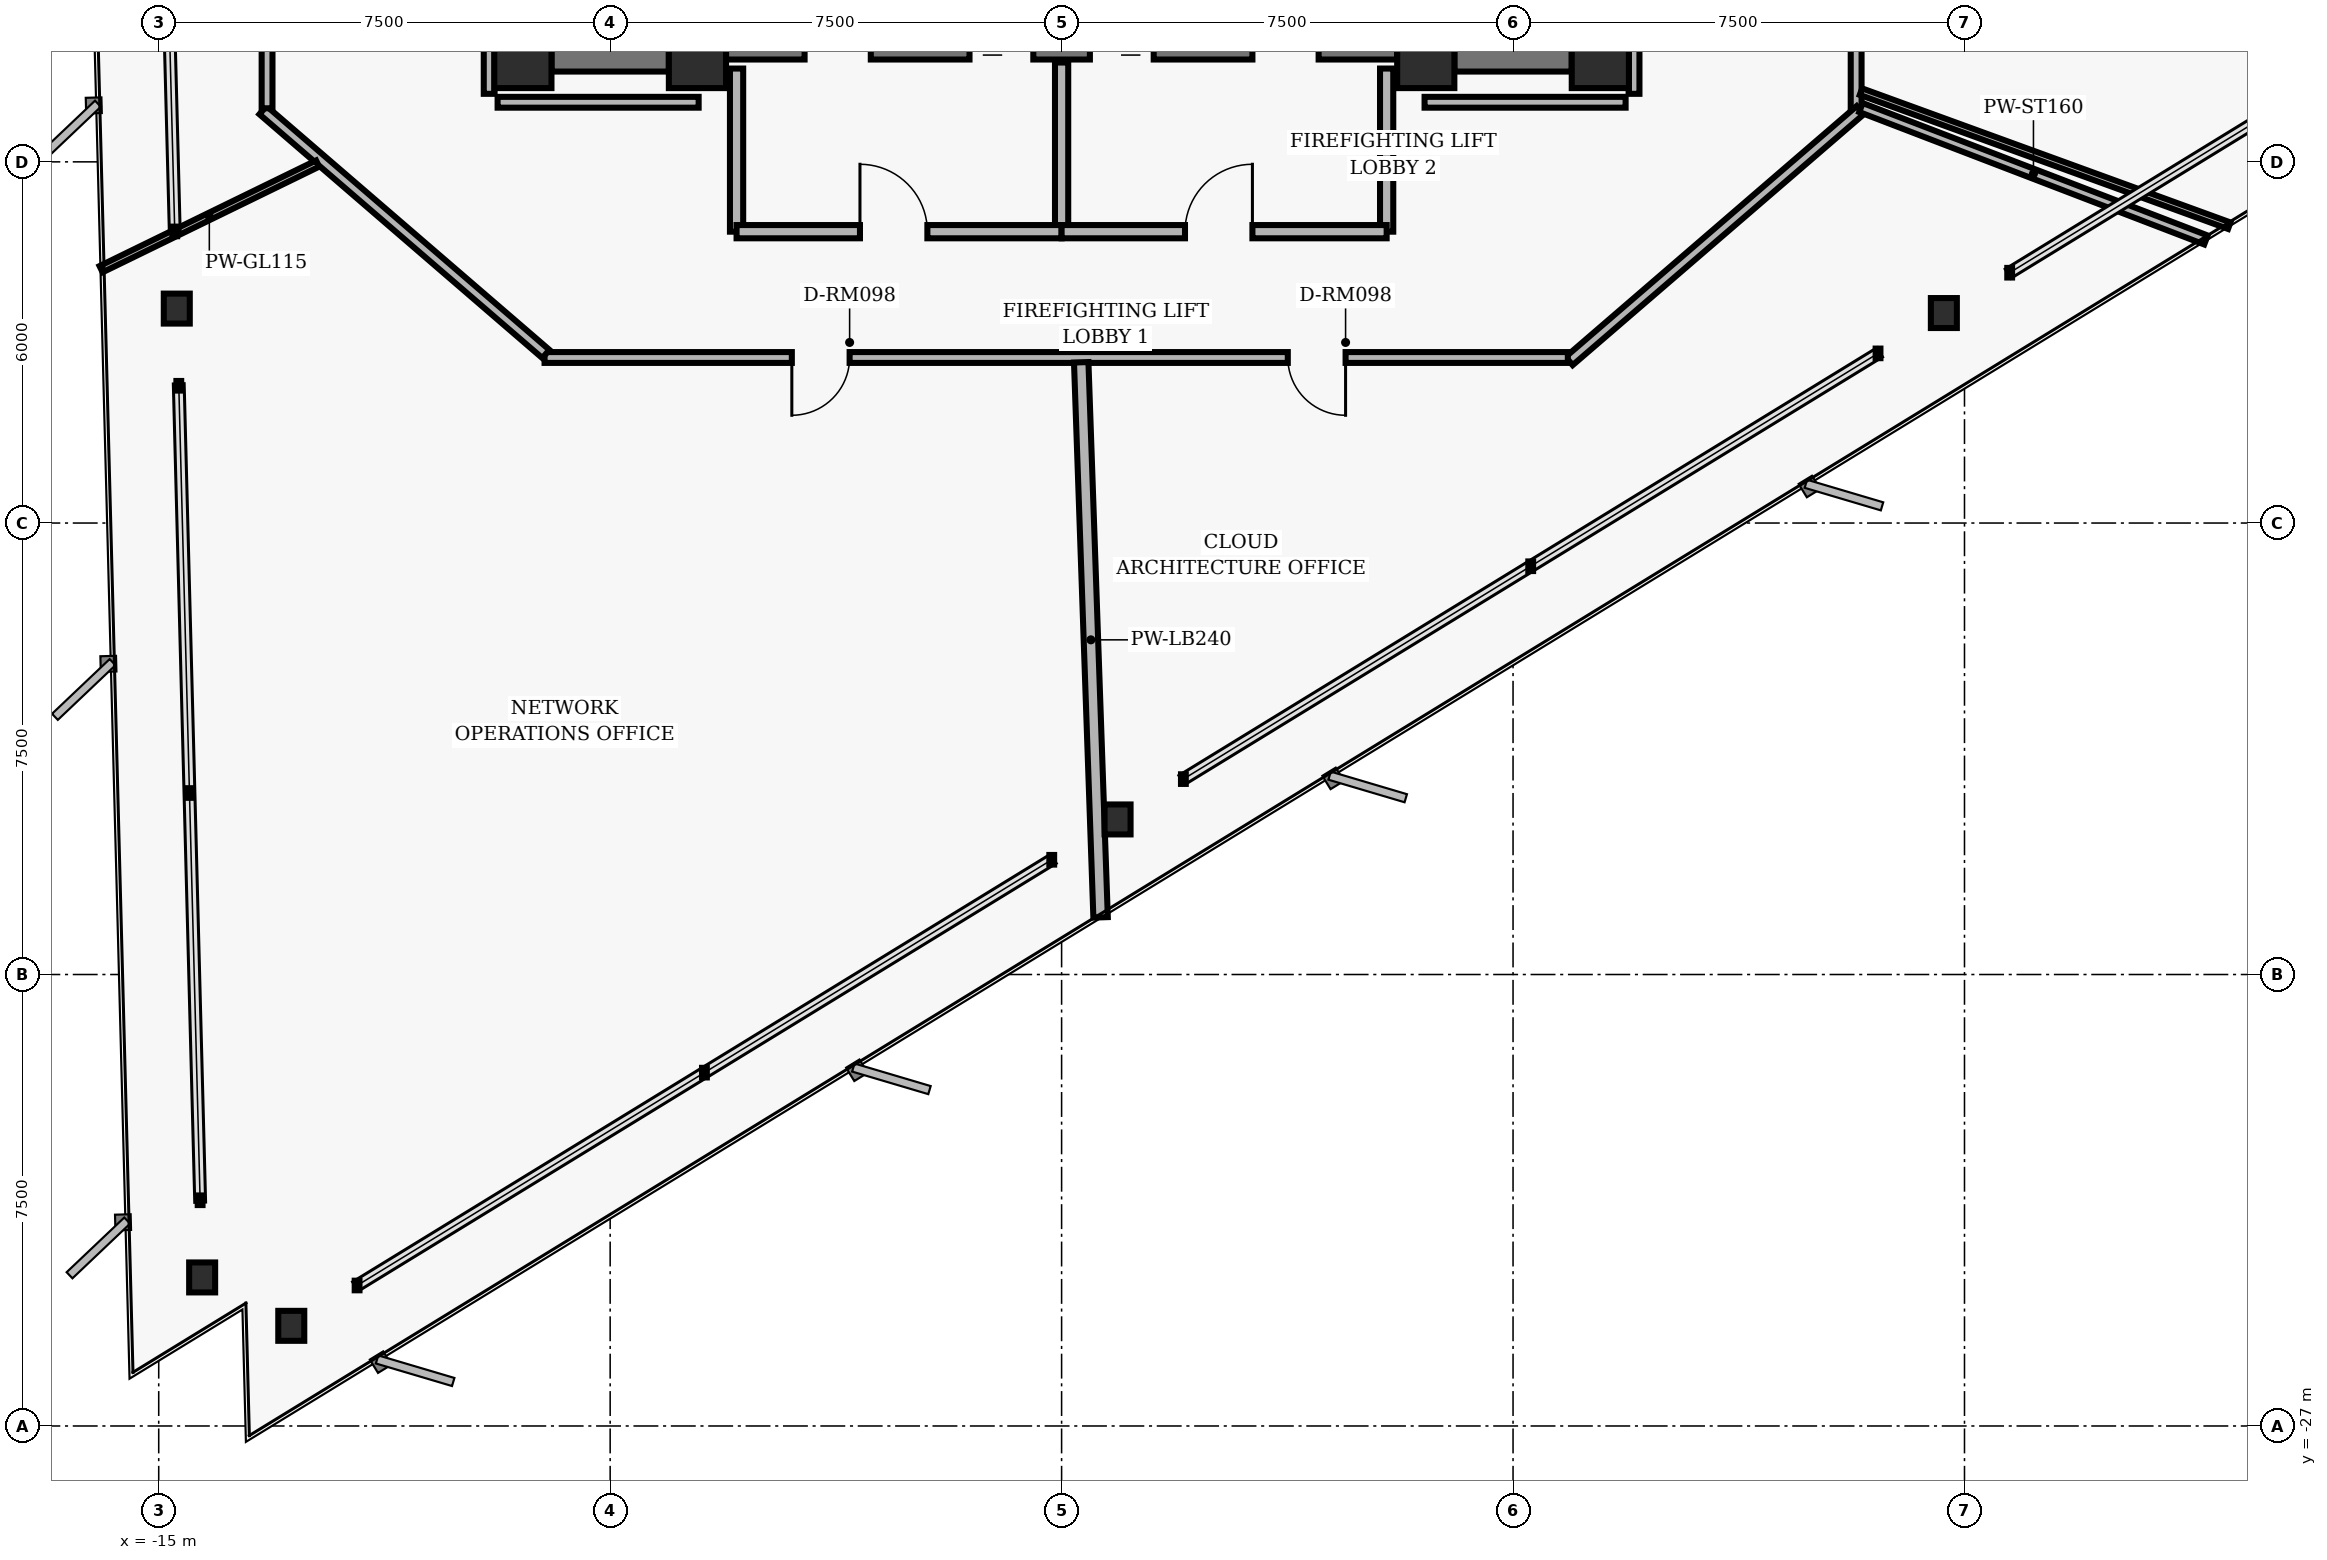
"""IFC4 building model, lengths in metres.
Left out: names, types, materials, properties, quantities, classifications, styles, units other than length and angle.
Written with IfcOpenShell. Run it as: python <this file> out.ifc"""

import sys

from ifc_helpers import new_model, si_unit, direction, frame, frame_2d, origin, origin_2d, place, context, subcontext, project, spatial, rectangle, hollow_rectangle, i_section, extrude, element, fill, save


model = new_model("IFC4")
c1 = context("Model", 3, precision=1e-05, world=origin(), true_north=direction((0.0, 1.0)))
c2 = subcontext(c1, "Body", "Model", "MODEL_VIEW")
j1 = project(units=[si_unit("LENGTHUNIT", "METRE"), si_unit("PLANEANGLEUNIT", "RADIAN")], contexts=[c1])
p1 = place(None, origin())
s1 = spatial("IfcSite", under=j1, at=p1, CompositionType="ELEMENT")
p2 = place(p1, origin())
s2 = spatial("IfcBuilding", under=s1, at=p2, CompositionType="ELEMENT")
p3 = place(p2, frame((0.0, 0.0, 25.6)))
s3 = spatial("IfcBuildingStorey", under=s2, at=p3, CompositionType="ELEMENT", Elevation=25.6)
for number, where, z_axis, x_axis in (
    (1, (-6.05, -4.3, 0.0), (0.0, 0.0, 1.0), (1.0, 0.0, 0.0)),
    (2, (6.05, -4.3, 0.0), (0.0, 0.0, 1.0), (1.0, 0.0, 0.0)),
    (3, (-8.95, -4.3, 0.0), (0.0, 0.0, 1.0), (1.0, 0.0, 0.0)),
    (4, (8.95, -4.3, 0.0), (0.0, 0.0, 1.0), (1.0, 0.0, 0.0)),
):
    element("IfcColumn", number, at=place(p3, frame(where, z_axis=z_axis, x_axis=x_axis)), inside=s3, PredefinedType="COLUMN", context=c2, shape_type="SweptSolid", body=[
        extrude(hollow_rectangle(XDim=0.95, YDim=0.95, WallThickness=0.06, InnerFilletRadius=0.02, OuterFilletRadius=0.04, at=origin_2d()), origin(), (0.0, 0.0, 1.0), 3.36),
    ])
p4 = place(p3, frame((-5.575, -4.1, 0.0), z_axis=(0.0, 0.0, 1.0), x_axis=(1.0, 0.0, 0.0)))
e5 = element("IfcWall", 5, at=p4, inside=s3, PredefinedType="SHEAR", context=c2, shape_type="SweptSolid", body=[
    extrude(rectangle(XDim=11.15, YDim=0.4, at=frame_2d((5.575, 0.0))), origin(), (0.0, 0.0, 1.0), 3.098),
])
p5 = place(p4, frame((1.305, 0.0, 0.0)))
e6 = element("IfcOpeningElement", 6, at=p5, cuts=e5, PredefinedType="OPENING", context=c2, shape_type="SweptSolid", body=[
    extrude(rectangle(XDim=1.1, YDim=2.04, at=frame_2d((0.55, 1.02))), frame((0.0, 0.21, 0.0), z_axis=(0.0, -1.0, 0.0), x_axis=(1.0, 0.0, 0.0)), (0.0, 0.0, 1.0), 0.42),
])
p6 = place(p4, frame((8.745, 0.0, 0.0)))
e7 = element("IfcOpeningElement", 7, at=p6, cuts=e5, PredefinedType="OPENING", context=c2, shape_type="SweptSolid", body=[
    extrude(rectangle(XDim=1.1, YDim=2.04, at=frame_2d((0.55, 1.02))), frame((0.0, 0.21, 0.0), z_axis=(0.0, -1.0, 0.0), x_axis=(1.0, 0.0, 0.0)), (0.0, 0.0, 1.0), 0.42),
])
p7 = place(p4, frame((4.045, 0.0, 0.0)))
e8 = element("IfcOpeningElement", 8, at=p7, cuts=e5, PredefinedType="OPENING", context=c2, shape_type="SweptSolid", body=[
    extrude(rectangle(XDim=1.06, YDim=2.04, at=frame_2d((0.53, 1.02))), frame((0.0, 0.21, 0.0), z_axis=(0.0, -1.0, 0.0), x_axis=(1.0, 0.0, 0.0)), (0.0, 0.0, 1.0), 0.42),
])
p8 = place(p4, frame((6.045, 0.0, 0.0)))
e9 = element("IfcOpeningElement", 9, at=p8, cuts=e5, PredefinedType="OPENING", context=c2, shape_type="SweptSolid", body=[
    extrude(rectangle(XDim=1.06, YDim=2.04, at=frame_2d((0.53, 1.02))), frame((0.0, 0.21, 0.0), z_axis=(0.0, -1.0, 0.0), x_axis=(1.0, 0.0, 0.0)), (0.0, 0.0, 1.0), 0.42),
])
for number, where, z_axis, x_axis in (
    (10, (-8.475, -4.3, 0.0), (0.0, 0.0, 1.0), (1.0, 0.0, 0.0)),
    (11, (6.525, -4.3, 0.0), (0.0, 0.0, 1.0), (1.0, 0.0, 0.0)),
):
    element("IfcWall", number, at=place(p3, frame(where, z_axis=z_axis, x_axis=x_axis)), inside=s3, PredefinedType="SHEAR", context=c2, shape_type="SweptSolid", body=[
        extrude(rectangle(XDim=1.95, YDim=0.4, at=frame_2d((0.975, 0.0))), origin(), (0.0, 0.0, 1.0), 3.098),
    ])
for number, where, z_axis, x_axis in (
    (12, (-14.7, -8.438, 0.0), (0.0, 0.0, 1.0), (1.0, 0.0, 0.0)),
    (13, (-14.279, -24.532, 0.0), (0.0, 0.0, 1.0), (1.0, 0.0, 0.0)),
    (14, (-12.798, -25.336, 0.0), (0.0, 0.0, 1.0), (1.0, 0.0, 0.0)),
    (15, (0.93, -16.924, 0.0), (0.0, 0.0, 1.0), (1.0, 0.0, 0.0)),
    (16, (14.657, -8.512, 0.0), (0.0, 0.0, 1.0), (1.0, 0.0, 0.0)),
):
    element("IfcColumn", number, at=place(p3, frame(where, z_axis=z_axis, x_axis=x_axis)), inside=s3, PredefinedType="COLUMN", context=c2, shape_type="SweptSolid", body=[
        extrude(i_section(OverallWidth=0.432, OverallDepth=0.498, WebThickness=0.056, FlangeThickness=0.089, FilletRadius=0.025, at=origin_2d()), origin(), (0.0, 0.0, 1.0), 3.36),
    ])
for number, where, z_axis, x_axis in (
    (17, (-5.4, -7.16, 0.0), (0.0, 0.0, 1.0), (0.0, 1.0, 0.0)),
    (18, (5.4, -7.16, 0.0), (0.0, 0.0, 1.0), (0.0, 1.0, 0.0)),
):
    element("IfcWall", number, at=place(p3, frame(where, z_axis=z_axis, x_axis=x_axis)), inside=s3, PredefinedType="PARTITIONING", context=c2, shape_type="SweptSolid", body=[
        extrude(rectangle(XDim=2.71, YDim=0.22, at=frame_2d((1.355, 0.0))), origin(), (0.0, 0.0, 1.0), 3.073),
    ])
p9 = place(p3, frame((0.0, -7.16, 0.0), z_axis=(0.0, 0.0, 1.0), x_axis=(0.0, 1.0, 0.0)))
e19 = element("IfcWall", 19, at=p9, inside=s3, PredefinedType="PARTITIONING", context=c2, shape_type="SweptSolid", body=[
    extrude(rectangle(XDim=2.81, YDim=0.22, at=frame_2d((1.405, 0.0))), origin(), (0.0, 0.0, 1.0), 3.073),
])
p10 = place(p3, frame((-5.4, -7.16, 0.0), z_axis=(0.0, 0.0, 1.0), x_axis=(1.0, 0.0, 0.0)))
e20 = element("IfcWall", 20, at=p10, inside=s3, PredefinedType="PARTITIONING", context=c2, shape_type="SweptSolid", body=[
    extrude(rectangle(XDim=5.4, YDim=0.22, at=frame_2d((2.7, 0.0))), origin(), (0.0, 0.0, 1.0), 3.073),
])
p11 = place(p10, frame((2.05, 0.0, 0.0)))
e21 = element("IfcOpeningElement", 21, at=p11, cuts=e20, PredefinedType="OPENING", context=c2, shape_type="SweptSolid", body=[
    extrude(rectangle(XDim=1.12, YDim=2.02, at=frame_2d((0.56, 1.01))), frame((0.0, 0.12, 0.0), z_axis=(0.0, -1.0, 0.0), x_axis=(1.0, 0.0, 0.0)), (0.0, 0.0, 1.0), 0.24),
])
p12 = place(p3, frame((0.0, -7.16, 0.0), z_axis=(0.0, 0.0, 1.0), x_axis=(1.0, 0.0, 0.0)))
e22 = element("IfcWall", 22, at=p12, inside=s3, PredefinedType="PARTITIONING", context=c2, shape_type="SweptSolid", body=[
    extrude(rectangle(XDim=5.4, YDim=0.22, at=frame_2d((2.7, 0.0))), origin(), (0.0, 0.0, 1.0), 3.073),
])
p13 = place(p12, frame((2.05, 0.0, 0.0)))
e23 = element("IfcOpeningElement", 23, at=p13, cuts=e22, PredefinedType="OPENING", context=c2, shape_type="SweptSolid", body=[
    extrude(rectangle(XDim=1.12, YDim=2.02, at=frame_2d((0.56, 1.01))), frame((0.0, 0.12, 0.0), z_axis=(0.0, -1.0, 0.0), x_axis=(1.0, 0.0, 0.0)), (0.0, 0.0, 1.0), 0.24),
])
p14 = place(p3, frame((13.2, 5.11, 0.0), z_axis=(0.0, 0.0, 1.0), x_axis=(0.0, -1.0, 0.0)))
e24 = element("IfcWall", 24, at=p14, inside=s3, PredefinedType="PARTITIONING", context=c2, shape_type="SweptSolid", body=[
    extrude(rectangle(XDim=10.22, YDim=0.18, at=frame_2d((5.11, 0.0))), origin(), (0.0, 0.0, 1.0), 3.073),
])
p15 = place(p14, frame((4.591, 0.0, 0.0)))
e25 = element("IfcOpeningElement", 25, at=p15, cuts=e24, PredefinedType="OPENING", context=c2, shape_type="SweptSolid", body=[
    extrude(rectangle(XDim=1.02, YDim=2.02, at=frame_2d((0.51, 1.01))), frame((0.0, 0.1, 0.0), z_axis=(0.0, -1.0, 0.0), x_axis=(1.0, 0.0, 0.0)), (0.0, 0.0, 1.0), 0.2),
])
p16 = place(p3, frame((13.268, -5.141, 0.0), z_axis=(0.0, 0.0, 1.0), x_axis=(-0.757534501725, -0.65279512766, 0.0)))
e26 = element("IfcWall", 26, at=p16, inside=s3, PredefinedType="PARTITIONING", context=c2, shape_type="SweptSolid", body=[
    extrude(rectangle(XDim=6.385, YDim=0.18, at=frame_2d((3.192, 0.0))), origin(), (0.0, 0.0, 1.0), 2.587),
])
p17 = place(p3, frame((8.41, -9.25, 0.0), z_axis=(0.0, 0.0, 1.0), x_axis=(-1.0, 0.0, 0.0)))
e27 = element("IfcWall", 27, at=p17, inside=s3, PredefinedType="PARTITIONING", context=c2, shape_type="SweptSolid", body=[
    extrude(rectangle(XDim=17.0, YDim=0.18, at=frame_2d((8.5, 0.0))), origin(), (0.0, 0.0, 1.0), 2.587),
])
p18 = place(p17, frame((11.932, 0.0, 0.0)))
e28 = element("IfcOpeningElement", 28, at=p18, cuts=e27, PredefinedType="OPENING", context=c2, shape_type="SweptSolid", body=[
    extrude(rectangle(XDim=0.96, YDim=2.02, at=frame_2d((0.48, 1.01))), frame((0.0, 0.1, 0.0), z_axis=(0.0, -1.0, 0.0), x_axis=(1.0, 0.0, 0.0)), (0.0, 0.0, 1.0), 0.2),
])
p19 = place(p17, frame((3.692, 0.0, 0.0)))
e29 = element("IfcOpeningElement", 29, at=p19, cuts=e27, PredefinedType="OPENING", context=c2, shape_type="SweptSolid", body=[
    extrude(rectangle(XDim=0.96, YDim=2.02, at=frame_2d((0.48, 1.01))), frame((0.0, 0.1, 0.0), z_axis=(0.0, -1.0, 0.0), x_axis=(1.0, 0.0, 0.0)), (0.0, 0.0, 1.0), 0.2),
])
p20 = place(p3, frame((-8.568, -9.191, 0.0), z_axis=(0.0, 0.0, 1.0), x_axis=(-0.757556899173, 0.652769135694, 0.0)))
e30 = element("IfcWall", 30, at=p20, inside=s3, PredefinedType="PARTITIONING", context=c2, shape_type="SweptSolid", body=[
    extrude(rectangle(XDim=6.204, YDim=0.18, at=frame_2d((3.102, 0.0))), origin(), (0.0, 0.0, 1.0), 3.073),
])
p21 = place(p3, frame((-13.2, -5.11, 0.0), z_axis=(0.0, 0.0, 1.0), x_axis=(0.0, 1.0, 0.0)))
e31 = element("IfcWall", 31, at=p21, inside=s3, PredefinedType="PARTITIONING", context=c2, shape_type="SweptSolid", body=[
    extrude(rectangle(XDim=10.22, YDim=0.18, at=frame_2d((5.11, 0.0))), origin(), (0.0, 0.0, 1.0), 2.587),
])
p22 = place(p21, frame((4.361, 0.0, 0.0)))
e32 = element("IfcOpeningElement", 32, at=p22, cuts=e31, PredefinedType="OPENING", context=c2, shape_type="SweptSolid", body=[
    extrude(rectangle(XDim=0.96, YDim=2.02, at=frame_2d((0.48, 1.01))), frame((0.0, 0.1, 0.0), z_axis=(0.0, -1.0, 0.0), x_axis=(1.0, 0.0, 0.0)), (0.0, 0.0, 1.0), 0.2),
])
p23 = place(p3, frame((-9.51, -4.05, 0.0), z_axis=(0.0, 0.0, 1.0), x_axis=(0.0, -1.0, 0.0)))
e33 = element("IfcWall", 33, at=p23, inside=s3, PredefinedType="PARTITIONING", context=c2, shape_type="SweptSolid", body=[
    extrude(rectangle(XDim=0.82, YDim=0.18, at=frame_2d((0.41, 0.0))), origin(), (0.0, 0.0, 1.0), 2.358),
])
for number, where, z_axis, x_axis in (
    (34, (-9.37, -5.01, 0.0), (0.0, 0.0, 1.0), (1.0, 0.0, 0.0)),
    (35, (6.03, -5.01, 0.0), (0.0, 0.0, 1.0), (1.0, 0.0, 0.0)),
):
    element("IfcWall", number, at=place(p3, frame(where, z_axis=z_axis, x_axis=x_axis)), inside=s3, PredefinedType="PARTITIONING", context=c2, shape_type="SweptSolid", body=[
        extrude(rectangle(XDim=3.34, YDim=0.18, at=frame_2d((1.67, 0.0))), origin(), (0.0, 0.0, 1.0), 3.073),
    ])
p24 = place(p3, frame((9.51, -4.87, 0.0), z_axis=(0.0, 0.0, 1.0), x_axis=(0.0, 1.0, 0.0)))
e36 = element("IfcWall", 36, at=p24, inside=s3, PredefinedType="PARTITIONING", context=c2, shape_type="SweptSolid", body=[
    extrude(rectangle(XDim=9.74, YDim=0.18, at=frame_2d((4.87, 0.0))), origin(), (0.0, 0.0, 1.0), 3.073),
])
p25 = place(p3, frame((-12.361, -6.029, 0.0), z_axis=(0.0, 0.0, 1.0), x_axis=(-0.898800692661, -0.438357519466, 0.0)))
e37 = element("IfcWall", 37, at=p25, inside=s3, PredefinedType="MOVABLE", context=c2, shape_type="SweptSolid", body=[
    extrude(rectangle(XDim=4.002, YDim=0.115, at=frame_2d((2.001, 0.0))), origin(), (0.0, 0.0, 1.0), 3.073),
])
p26 = place(p3, frame((0.326, -9.33, 0.0), z_axis=(0.0, 0.0, 1.0), x_axis=(0.034901543767, -0.999390755532, 0.0)))
e38 = element("IfcWall", 38, at=p26, inside=s3, PredefinedType="PARTITIONING", context=c2, shape_type="SweptSolid", body=[
    extrude(rectangle(XDim=9.227, YDim=0.24, at=frame_2d((4.613, 0.0))), origin(), (0.0, 0.0, 1.0), 3.073),
])
p27 = place(p3, frame((13.28, -5.098, 0.0), z_axis=(0.0, 0.0, 1.0), x_axis=(0.933574999212, -0.358382087787, 0.0)))
e39 = element("IfcWall", 39, at=p27, inside=s3, PredefinedType="PARTITIONING", context=c2, shape_type="SweptSolid", body=[
    extrude(rectangle(XDim=6.139, YDim=0.16, at=frame_2d((3.07, 0.0))), origin(), (0.0, 0.0, 1.0), 3.073),
])
p28 = place(p3, frame((13.28, -4.833, 0.0), z_axis=(0.0, 0.0, 1.0), x_axis=(0.939690475906, -0.342026036278, 0.0)))
e40 = element("IfcWall", 40, at=p28, inside=s3, PredefinedType="MOVABLE", context=c2, shape_type="SweptSolid", body=[
    extrude(rectangle(XDim=6.511, YDim=0.115, at=frame_2d((3.256, 0.0))), origin(), (0.0, 0.0, 1.0), 3.073),
])
p29 = place(p11, origin())
e41 = element("IfcDoor", 41, at=p29, inside=s3, OperationType="SINGLE_SWING_LEFT", PredefinedType="DOOR", context=c2, shape_type="SweptSolid", body=[
    extrude(rectangle(XDim=1.12, YDim=2.02, at=frame_2d((0.56, 1.01))), frame((0.0, 0.025, 0.0), z_axis=(0.0, -1.0, 0.0), x_axis=(1.0, 0.0, 0.0)), (0.0, 0.0, 1.0), 0.05),
])
fill(e21, e41)
p30 = place(p13, origin())
e42 = element("IfcDoor", 42, at=p30, inside=s3, OperationType="SINGLE_SWING_RIGHT", PredefinedType="DOOR", context=c2, shape_type="SweptSolid", body=[
    extrude(rectangle(XDim=1.12, YDim=2.02, at=frame_2d((0.56, 1.01))), frame((0.0, 0.025, 0.0), z_axis=(0.0, -1.0, 0.0), x_axis=(1.0, 0.0, 0.0)), (0.0, 0.0, 1.0), 0.05),
])
fill(e23, e42)
p31 = place(p18, origin())
e43 = element("IfcDoor", 43, at=p31, inside=s3, OperationType="SINGLE_SWING_RIGHT", PredefinedType="DOOR", context=c2, shape_type="SweptSolid", body=[
    extrude(rectangle(XDim=0.96, YDim=2.02, at=frame_2d((0.48, 1.01))), frame((0.0, 0.025, 0.0), z_axis=(0.0, -1.0, 0.0), x_axis=(1.0, 0.0, 0.0)), (0.0, 0.0, 1.0), 0.05),
])
fill(e28, e43)
p32 = place(p19, origin())
e44 = element("IfcDoor", 44, at=p32, inside=s3, OperationType="SINGLE_SWING_LEFT", PredefinedType="DOOR", context=c2, shape_type="SweptSolid", body=[
    extrude(rectangle(XDim=0.96, YDim=2.02, at=frame_2d((0.48, 1.01))), frame((0.0, 0.025, 0.0), z_axis=(0.0, -1.0, 0.0), x_axis=(1.0, 0.0, 0.0)), (0.0, 0.0, 1.0), 0.05),
])
fill(e29, e44)
save(model, sys.argv[1])
